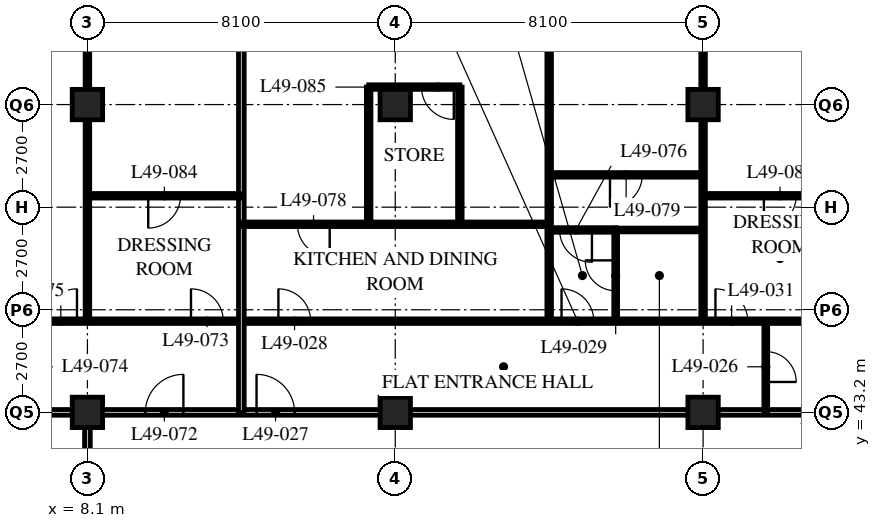
"""IFC4 building model, lengths in metres.
Left out: names, types, materials, properties, quantities, classifications, styles, units other than length and angle.
Written with IfcOpenShell. Run it as: python <this file> out.ifc"""

import sys

from ifc_helpers import new_model, si_unit, direction, frame, frame_2d, origin, origin_2d, place, context, subcontext, project, spatial, rectangle, hollow_rectangle, extrude, element, fill, save


model = new_model("IFC4")
c1 = context("Model", 3, precision=1e-05, world=origin(), true_north=direction((0.0, 1.0)))
c2 = subcontext(c1, "Body", "Model", "MODEL_VIEW")
j1 = project(units=[si_unit("LENGTHUNIT", "METRE"), si_unit("PLANEANGLEUNIT", "RADIAN")], contexts=[c1])
p1 = place(None, origin())
s1 = spatial("IfcSite", under=j1, at=p1, CompositionType="ELEMENT")
p2 = place(p1, origin())
s2 = spatial("IfcBuilding", under=s1, at=p2, CompositionType="ELEMENT")
p3 = place(p2, frame((0.0, 0.0, 192.0)))
s3 = spatial("IfcBuildingStorey", under=s2, at=p3, CompositionType="ELEMENT", Elevation=192.0)
for number, where, z_axis, x_axis in (
    (1, (8.1, 43.2, 0.0), (0.0, 0.0, 1.0), (1.0, 0.0, 0.0)),
    (2, (8.1, 51.3, 0.0), (0.0, 0.0, 1.0), (1.0, 0.0, 0.0)),
    (3, (16.2, 43.2, 0.0), (0.0, 0.0, 1.0), (1.0, 0.0, 0.0)),
    (4, (16.2, 51.3, 0.0), (0.0, 0.0, 1.0), (1.0, 0.0, 0.0)),
    (5, (24.3, 43.2, 0.0), (0.0, 0.0, 1.0), (1.0, 0.0, 0.0)),
    (6, (24.3, 51.3, 0.0), (0.0, 0.0, 1.0), (1.0, 0.0, 0.0)),
):
    element("IfcColumn", number, at=place(p3, frame(where, z_axis=z_axis, x_axis=x_axis)), inside=s3, PredefinedType="COLUMN", context=c2, shape_type="SweptSolid", body=[
        extrude(hollow_rectangle(XDim=0.8, YDim=0.8, WallThickness=0.08, at=origin_2d()), origin(), (0.0, 0.0, 1.0), 3.6),
    ])
p4 = place(p3, frame((8.1, 43.2, 0.0), z_axis=(0.0, 0.0, 1.0), x_axis=(1.0, 0.0, 0.0)))
e7 = element("IfcWall", 7, at=p4, inside=s3, PredefinedType="PARTITIONING", context=c2, shape_type="SweptSolid", body=[
    extrude(rectangle(XDim=40.5, YDim=0.15, at=frame_2d((20.25, 0.0))), origin(), (0.0, 0.0, 1.0), 2.778),
])
p5 = place(p4, frame((4.45, 0.0, 0.0)))
e8 = element("IfcOpeningElement", 8, at=p5, cuts=e7, PredefinedType="OPENING", context=c2, shape_type="SweptSolid", body=[
    extrude(rectangle(XDim=1.0, YDim=2.1, at=frame_2d((0.5, 1.05))), frame((0.0, 0.085, 0.0), z_axis=(0.0, -1.0, 0.0), x_axis=(1.0, 0.0, 0.0)), (0.0, 0.0, 1.0), 0.17),
])
p6 = place(p4, frame((20.65, 0.0, 0.0)))
e9 = element("IfcOpeningElement", 9, at=p6, cuts=e7, PredefinedType="OPENING", context=c2, shape_type="SweptSolid", body=[
    extrude(rectangle(XDim=1.0, YDim=2.1, at=frame_2d((0.5, 1.05))), frame((0.0, 0.085, 0.0), z_axis=(0.0, -1.0, 0.0), x_axis=(1.0, 0.0, 0.0)), (0.0, 0.0, 1.0), 0.17),
])
p7 = place(p4, frame((28.75, 0.0, 0.0)))
e10 = element("IfcOpeningElement", 10, at=p7, cuts=e7, PredefinedType="OPENING", context=c2, shape_type="SweptSolid", body=[
    extrude(rectangle(XDim=1.0, YDim=2.1, at=frame_2d((0.5, 1.05))), frame((0.0, 0.085, 0.0), z_axis=(0.0, -1.0, 0.0), x_axis=(1.0, 0.0, 0.0)), (0.0, 0.0, 1.0), 0.17),
])
p8 = place(p4, frame((37.975, 0.0, 0.0)))
e11 = element("IfcOpeningElement", 11, at=p8, cuts=e7, PredefinedType="OPENING", context=c2, shape_type="SweptSolid", body=[
    extrude(rectangle(XDim=1.0, YDim=2.1, at=frame_2d((0.5, 1.05))), frame((0.0, 0.085, 0.0), z_axis=(0.0, -1.0, 0.0), x_axis=(1.0, 0.0, 0.0)), (0.0, 0.0, 1.0), 0.17),
])
p9 = place(p4, frame((1.525, 0.0, 0.0)))
e12 = element("IfcOpeningElement", 12, at=p9, cuts=e7, PredefinedType="OPENING", context=c2, shape_type="SweptSolid", body=[
    extrude(rectangle(XDim=1.0, YDim=2.1, at=frame_2d((0.5, 1.05))), frame((0.0, 0.085, 0.0), z_axis=(0.0, -1.0, 0.0), x_axis=(1.0, 0.0, 0.0)), (0.0, 0.0, 1.0), 0.17),
])
p10 = place(p3, frame((8.1, 18.9, 0.0), z_axis=(0.0, 0.0, 1.0), x_axis=(0.0, 1.0, 0.0)))
e13 = element("IfcWall", 13, at=p10, inside=s3, PredefinedType="PARTITIONING", context=c2, shape_type="SweptSolid", body=[
    extrude(rectangle(XDim=24.3, YDim=0.15, at=frame_2d((12.15, 0.0))), origin(), (0.0, 0.0, 1.0), 2.778),
])
p11 = place(p10, frame((0.9, 0.0, 0.0)))
e14 = element("IfcOpeningElement", 14, at=p11, cuts=e13, PredefinedType="OPENING", context=c2, shape_type="SweptSolid", body=[
    extrude(rectangle(XDim=1.0, YDim=2.1, at=frame_2d((0.5, 1.05))), frame((0.0, 0.085, 0.0), z_axis=(0.0, -1.0, 0.0), x_axis=(1.0, 0.0, 0.0)), (0.0, 0.0, 1.0), 0.17),
])
p12 = place(p10, frame((9.0, 0.0, 0.0)))
e15 = element("IfcOpeningElement", 15, at=p12, cuts=e13, PredefinedType="OPENING", context=c2, shape_type="SweptSolid", body=[
    extrude(rectangle(XDim=1.0, YDim=2.1, at=frame_2d((0.5, 1.05))), frame((0.0, 0.085, 0.0), z_axis=(0.0, -1.0, 0.0), x_axis=(1.0, 0.0, 0.0)), (0.0, 0.0, 1.0), 0.17),
])
p13 = place(p10, frame((17.1, 0.0, 0.0)))
e16 = element("IfcOpeningElement", 16, at=p13, cuts=e13, PredefinedType="OPENING", context=c2, shape_type="SweptSolid", body=[
    extrude(rectangle(XDim=1.0, YDim=2.1, at=frame_2d((0.5, 1.05))), frame((0.0, 0.085, 0.0), z_axis=(0.0, -1.0, 0.0), x_axis=(1.0, 0.0, 0.0)), (0.0, 0.0, 1.0), 0.17),
])
p14 = place(p3, frame((25.95, 43.2, 0.0), z_axis=(0.0, 0.0, 1.0), x_axis=(0.0, 1.0, 0.0)))
e17 = element("IfcWall", 17, at=p14, inside=s3, PredefinedType="PARTITIONING", context=c2, shape_type="SweptSolid", body=[
    extrude(rectangle(XDim=2.4, YDim=0.1, at=frame_2d((1.2, 0.0))), origin(), (0.0, 0.0, 1.0), 3.39),
])
p15 = place(p14, frame((0.8, 0.0, 0.0)))
e18 = element("IfcOpeningElement", 18, at=p15, cuts=e17, PredefinedType="OPENING", context=c2, shape_type="SweptSolid", body=[
    extrude(rectangle(XDim=0.8, YDim=2.1, at=frame_2d((0.4, 1.05))), frame((0.0, 0.06, 0.0), z_axis=(0.0, -1.0, 0.0), x_axis=(1.0, 0.0, 0.0)), (0.0, 0.0, 1.0), 0.12),
])
p16 = place(p3, frame((22.0, 45.6, 0.0), z_axis=(0.0, 0.0, 1.0), x_axis=(0.0, 1.0, 0.0)))
e19 = element("IfcWall", 19, at=p16, inside=s3, PredefinedType="PARTITIONING", context=c2, shape_type="SweptSolid", body=[
    extrude(rectangle(XDim=2.4, YDim=0.1, at=frame_2d((1.2, 0.0))), origin(), (0.0, 0.0, 1.0), 3.39),
])
p17 = place(p16, frame((0.8, 0.0, 0.0)))
e20 = element("IfcOpeningElement", 20, at=p17, cuts=e19, PredefinedType="OPENING", context=c2, shape_type="SweptSolid", body=[
    extrude(rectangle(XDim=0.8, YDim=2.1, at=frame_2d((0.4, 1.05))), frame((0.0, 0.06, 0.0), z_axis=(0.0, -1.0, 0.0), x_axis=(1.0, 0.0, 0.0)), (0.0, 0.0, 1.0), 0.12),
])
p18 = place(p3, frame((22.0, 48.0, 0.0), z_axis=(0.0, 0.0, 1.0), x_axis=(1.0, 0.0, 0.0)))
e21 = element("IfcWall", 21, at=p18, inside=s3, PredefinedType="PARTITIONING", context=c2, shape_type="SweptSolid", body=[
    extrude(rectangle(XDim=2.3, YDim=0.1, at=frame_2d((1.15, 0.0))), origin(), (0.0, 0.0, 1.0), 3.39),
])
p19 = place(p3, frame((20.25, 45.6, 0.0), z_axis=(0.0, 0.0, 1.0), x_axis=(0.0, 1.0, 0.0)))
e22 = element("IfcWall", 22, at=p19, inside=s3, PredefinedType="PARTITIONING", context=c2, shape_type="SweptSolid", body=[
    extrude(rectangle(XDim=13.5, YDim=0.12, at=frame_2d((6.75, 0.0))), origin(), (0.0, 0.0, 1.0), 3.39),
])
p20 = place(p3, frame((24.3, 45.6, 0.0), z_axis=(0.0, 0.0, 1.0), x_axis=(0.0, 1.0, 0.0)))
e23 = element("IfcWall", 23, at=p20, inside=s3, PredefinedType="PARTITIONING", context=c2, shape_type="SweptSolid", body=[
    extrude(rectangle(XDim=13.5, YDim=0.12, at=frame_2d((6.75, 0.0))), origin(), (0.0, 0.0, 1.0), 2.778),
])
p21 = place(p3, frame((4.1, 45.6, 0.0), z_axis=(0.0, 0.0, 1.0), x_axis=(1.0, 0.0, 0.0)))
e24 = element("IfcWall", 24, at=p21, inside=s3, PredefinedType="PARTITIONING", context=c2, shape_type="SweptSolid", body=[
    extrude(rectangle(XDim=48.5, YDim=0.12, at=frame_2d((24.25, 0.0))), origin(), (0.0, 0.0, 1.0), 3.39),
])
p22 = place(p21, frame((9.025, 0.0, 0.0)))
e25 = element("IfcOpeningElement", 25, at=p22, cuts=e24, PredefinedType="OPENING", context=c2, shape_type="SweptSolid", body=[
    extrude(rectangle(XDim=0.85, YDim=2.1, at=frame_2d((0.425, 1.05))), frame((0.0, 0.07, 0.0), z_axis=(0.0, -1.0, 0.0), x_axis=(1.0, 0.0, 0.0)), (0.0, 0.0, 1.0), 0.14),
])
p23 = place(p21, frame((16.475, 0.0, 0.0)))
e26 = element("IfcOpeningElement", 26, at=p23, cuts=e24, PredefinedType="OPENING", context=c2, shape_type="SweptSolid", body=[
    extrude(rectangle(XDim=0.85, YDim=2.1, at=frame_2d((0.425, 1.05))), frame((0.0, 0.07, 0.0), z_axis=(0.0, -1.0, 0.0), x_axis=(1.0, 0.0, 0.0)), (0.0, 0.0, 1.0), 0.14),
])
p24 = place(p21, frame((20.525, 0.0, 0.0)))
e27 = element("IfcOpeningElement", 27, at=p24, cuts=e24, PredefinedType="OPENING", context=c2, shape_type="SweptSolid", body=[
    extrude(rectangle(XDim=0.85, YDim=2.1, at=frame_2d((0.425, 1.05))), frame((0.0, 0.07, 0.0), z_axis=(0.0, -1.0, 0.0), x_axis=(1.0, 0.0, 0.0)), (0.0, 0.0, 1.0), 0.14),
])
p25 = place(p21, frame((25.225, 0.0, 0.0)))
e28 = element("IfcOpeningElement", 28, at=p25, cuts=e24, PredefinedType="OPENING", context=c2, shape_type="SweptSolid", body=[
    extrude(rectangle(XDim=0.85, YDim=2.1, at=frame_2d((0.425, 1.05))), frame((0.0, 0.07, 0.0), z_axis=(0.0, -1.0, 0.0), x_axis=(1.0, 0.0, 0.0)), (0.0, 0.0, 1.0), 0.14),
])
p26 = place(p21, frame((28.625, 0.0, 0.0)))
e29 = element("IfcOpeningElement", 29, at=p26, cuts=e24, PredefinedType="OPENING", context=c2, shape_type="SweptSolid", body=[
    extrude(rectangle(XDim=0.85, YDim=2.1, at=frame_2d((0.425, 1.05))), frame((0.0, 0.07, 0.0), z_axis=(0.0, -1.0, 0.0), x_axis=(1.0, 0.0, 0.0)), (0.0, 0.0, 1.0), 0.14),
])
p27 = place(p21, frame((33.325, 0.0, 0.0)))
e30 = element("IfcOpeningElement", 30, at=p27, cuts=e24, PredefinedType="OPENING", context=c2, shape_type="SweptSolid", body=[
    extrude(rectangle(XDim=0.85, YDim=2.1, at=frame_2d((0.425, 1.05))), frame((0.0, 0.07, 0.0), z_axis=(0.0, -1.0, 0.0), x_axis=(1.0, 0.0, 0.0)), (0.0, 0.0, 1.0), 0.14),
])
p28 = place(p21, frame((36.725, 0.0, 0.0)))
e31 = element("IfcOpeningElement", 31, at=p28, cuts=e24, PredefinedType="OPENING", context=c2, shape_type="SweptSolid", body=[
    extrude(rectangle(XDim=0.85, YDim=2.1, at=frame_2d((0.425, 1.05))), frame((0.0, 0.07, 0.0), z_axis=(0.0, -1.0, 0.0), x_axis=(1.0, 0.0, 0.0)), (0.0, 0.0, 1.0), 0.14),
])
p29 = place(p21, frame((40.925, 0.0, 0.0)))
e32 = element("IfcOpeningElement", 32, at=p29, cuts=e24, PredefinedType="OPENING", context=c2, shape_type="SweptSolid", body=[
    extrude(rectangle(XDim=0.85, YDim=2.1, at=frame_2d((0.425, 1.05))), frame((0.0, 0.07, 0.0), z_axis=(0.0, -1.0, 0.0), x_axis=(1.0, 0.0, 0.0)), (0.0, 0.0, 1.0), 0.14),
])
p30 = place(p21, frame((44.775, 0.0, 0.0)))
e33 = element("IfcOpeningElement", 33, at=p30, cuts=e24, PredefinedType="OPENING", context=c2, shape_type="SweptSolid", body=[
    extrude(rectangle(XDim=0.85, YDim=2.1, at=frame_2d((0.425, 1.05))), frame((0.0, 0.07, 0.0), z_axis=(0.0, -1.0, 0.0), x_axis=(1.0, 0.0, 0.0)), (0.0, 0.0, 1.0), 0.14),
])
p31 = place(p21, frame((6.725, 0.0, 0.0)))
e34 = element("IfcOpeningElement", 34, at=p31, cuts=e24, PredefinedType="OPENING", context=c2, shape_type="SweptSolid", body=[
    extrude(rectangle(XDim=0.85, YDim=2.1, at=frame_2d((0.425, 1.05))), frame((0.0, 0.07, 0.0), z_axis=(0.0, -1.0, 0.0), x_axis=(1.0, 0.0, 0.0)), (0.0, 0.0, 1.0), 0.14),
])
p32 = place(p21, frame((2.875, 0.0, 0.0)))
e35 = element("IfcOpeningElement", 35, at=p32, cuts=e24, PredefinedType="OPENING", context=c2, shape_type="SweptSolid", body=[
    extrude(rectangle(XDim=0.85, YDim=2.1, at=frame_2d((0.425, 1.05))), frame((0.0, 0.07, 0.0), z_axis=(0.0, -1.0, 0.0), x_axis=(1.0, 0.0, 0.0)), (0.0, 0.0, 1.0), 0.14),
])
p33 = place(p3, frame((8.1, 45.6, 0.0), z_axis=(0.0, 0.0, 1.0), x_axis=(0.0, 1.0, 0.0)))
e36 = element("IfcWall", 36, at=p33, inside=s3, PredefinedType="PARTITIONING", context=c2, shape_type="SweptSolid", body=[
    extrude(rectangle(XDim=9.45, YDim=0.12, at=frame_2d((4.725, 0.0))), origin(), (0.0, 0.0, 1.0), 2.778),
])
p34 = place(p3, frame((0.3, 43.2, 0.0), z_axis=(0.0, 0.0, 1.0), x_axis=(1.0, 0.0, 0.0)))
e37 = element("IfcWall", 37, at=p34, inside=s3, PredefinedType="PARTITIONING", context=c2, shape_type="SweptSolid", body=[
    extrude(rectangle(XDim=7.8, YDim=0.15, at=frame_2d((3.9, 0.0))), origin(), (0.0, 0.0, 1.0), 2.778),
])
p35 = place(p3, frame((12.15, 43.2, 0.0), z_axis=(0.0, 0.0, 1.0), x_axis=(0.0, 1.0, 0.0)))
e38 = element("IfcWall", 38, at=p35, inside=s3, PredefinedType="PARTITIONING", context=c2, shape_type="SweptSolid", body=[
    extrude(rectangle(XDim=15.9, YDim=0.15, at=frame_2d((7.95, 0.0))), origin(), (0.0, 0.0, 1.0), 3.39),
])
p36 = place(p3, frame((20.25, 48.0, 0.0), z_axis=(0.0, 0.0, 1.0), x_axis=(1.0, 0.0, 0.0)))
e39 = element("IfcWall", 39, at=p36, inside=s3, PredefinedType="PARTITIONING", context=c2, shape_type="SweptSolid", body=[
    extrude(rectangle(XDim=1.76, YDim=0.12, at=frame_2d((0.88, 0.0))), origin(), (0.0, 0.0, 1.0), 3.39),
])
p37 = place(p36, frame((0.275, 0.0, 0.0)))
e40 = element("IfcOpeningElement", 40, at=p37, cuts=e39, PredefinedType="OPENING", context=c2, shape_type="SweptSolid", body=[
    extrude(rectangle(XDim=0.85, YDim=2.1, at=frame_2d((0.425, 1.05))), frame((0.0, 0.07, 0.0), z_axis=(0.0, -1.0, 0.0), x_axis=(1.0, 0.0, 0.0)), (0.0, 0.0, 1.0), 0.14),
])
p38 = place(p3, frame((12.15, 48.15, 0.0), z_axis=(0.0, 0.0, 1.0), x_axis=(1.0, 0.0, 0.0)))
e41 = element("IfcWall", 41, at=p38, inside=s3, PredefinedType="PARTITIONING", context=c2, shape_type="SweptSolid", body=[
    extrude(rectangle(XDim=8.1, YDim=0.12, at=frame_2d((4.05, 0.0))), origin(), (0.0, 0.0, 1.0), 3.39),
])
p39 = place(p38, frame((1.475, 0.0, 0.0)))
e42 = element("IfcOpeningElement", 42, at=p39, cuts=e41, PredefinedType="OPENING", context=c2, shape_type="SweptSolid", body=[
    extrude(rectangle(XDim=0.85, YDim=2.1, at=frame_2d((0.425, 1.05))), frame((0.0, 0.07, 0.0), z_axis=(0.0, -1.0, 0.0), x_axis=(1.0, 0.0, 0.0)), (0.0, 0.0, 1.0), 0.14),
])
p40 = place(p3, frame((20.25, 49.45, 0.0), z_axis=(0.0, 0.0, 1.0), x_axis=(1.0, 0.0, 0.0)))
e43 = element("IfcWall", 43, at=p40, inside=s3, PredefinedType="PARTITIONING", context=c2, shape_type="SweptSolid", body=[
    extrude(rectangle(XDim=4.05, YDim=0.12, at=frame_2d((2.025, 0.0))), origin(), (0.0, 0.0, 1.0), 3.39),
])
p41 = place(p40, frame((1.6, 0.0, 0.0)))
e44 = element("IfcOpeningElement", 44, at=p41, cuts=e43, PredefinedType="OPENING", context=c2, shape_type="SweptSolid", body=[
    extrude(rectangle(XDim=0.85, YDim=2.1, at=frame_2d((0.425, 1.05))), frame((0.0, 0.07, 0.0), z_axis=(0.0, -1.0, 0.0), x_axis=(1.0, 0.0, 0.0)), (0.0, 0.0, 1.0), 0.14),
])
p42 = place(p3, frame((24.3, 48.9, 0.0), z_axis=(0.0, 0.0, 1.0), x_axis=(1.0, 0.0, 0.0)))
e45 = element("IfcWall", 45, at=p42, inside=s3, PredefinedType="PARTITIONING", context=c2, shape_type="SweptSolid", body=[
    extrude(rectangle(XDim=4.05, YDim=0.12, at=frame_2d((2.025, 0.0))), origin(), (0.0, 0.0, 1.0), 3.39),
])
p43 = place(p42, frame((1.6, 0.0, 0.0)))
e46 = element("IfcOpeningElement", 46, at=p43, cuts=e45, PredefinedType="OPENING", context=c2, shape_type="SweptSolid", body=[
    extrude(rectangle(XDim=0.85, YDim=2.1, at=frame_2d((0.425, 1.05))), frame((0.0, 0.07, 0.0), z_axis=(0.0, -1.0, 0.0), x_axis=(1.0, 0.0, 0.0)), (0.0, 0.0, 1.0), 0.14),
])
p44 = place(p3, frame((8.1, 48.9, 0.0), z_axis=(0.0, 0.0, 1.0), x_axis=(1.0, 0.0, 0.0)))
e47 = element("IfcWall", 47, at=p44, inside=s3, PredefinedType="PARTITIONING", context=c2, shape_type="SweptSolid", body=[
    extrude(rectangle(XDim=4.05, YDim=0.12, at=frame_2d((2.025, 0.0))), origin(), (0.0, 0.0, 1.0), 3.39),
])
p45 = place(p44, frame((1.6, 0.0, 0.0)))
e48 = element("IfcOpeningElement", 48, at=p45, cuts=e47, PredefinedType="OPENING", context=c2, shape_type="SweptSolid", body=[
    extrude(rectangle(XDim=0.85, YDim=2.1, at=frame_2d((0.425, 1.05))), frame((0.0, 0.07, 0.0), z_axis=(0.0, -1.0, 0.0), x_axis=(1.0, 0.0, 0.0)), (0.0, 0.0, 1.0), 0.14),
])
for number, where, z_axis, x_axis in (
    (49, (15.5, 48.15, 0.0), (0.0, 0.0, 1.0), (0.0, 1.0, 0.0)),
    (50, (17.9, 48.15, 0.0), (0.0, 0.0, 1.0), (0.0, 1.0, 0.0)),
):
    element("IfcWall", number, at=place(p3, frame(where, z_axis=z_axis, x_axis=x_axis)), inside=s3, PredefinedType="PARTITIONING", context=c2, shape_type="SweptSolid", body=[
        extrude(rectangle(XDim=3.61, YDim=0.12, at=frame_2d((1.805, 0.0))), origin(), (0.0, 0.0, 1.0), 3.39),
    ])
p46 = place(p3, frame((15.5, 51.76, 0.0), z_axis=(0.0, 0.0, 1.0), x_axis=(1.0, 0.0, 0.0)))
e51 = element("IfcWall", 51, at=p46, inside=s3, PredefinedType="PARTITIONING", context=c2, shape_type="SweptSolid", body=[
    extrude(rectangle(XDim=2.4, YDim=0.12, at=frame_2d((1.2, 0.0))), origin(), (0.0, 0.0, 1.0), 3.39),
])
p47 = place(p46, frame((1.39, 0.0, 0.0)))
e52 = element("IfcOpeningElement", 52, at=p47, cuts=e51, PredefinedType="OPENING", context=c2, shape_type="SweptSolid", body=[
    extrude(rectangle(XDim=0.85, YDim=2.1, at=frame_2d((0.425, 1.05))), frame((0.0, 0.07, 0.0), z_axis=(0.0, -1.0, 0.0), x_axis=(1.0, 0.0, 0.0)), (0.0, 0.0, 1.0), 0.14),
])
p48 = place(p15, origin())
e53 = element("IfcDoor", 53, at=p48, inside=s3, OperationType="SINGLE_SWING_RIGHT", PredefinedType="DOOR", context=c2, shape_type="SweptSolid", body=[
    extrude(rectangle(XDim=0.8, YDim=2.1, at=frame_2d((0.4, 1.05))), frame((0.0, 0.025, 0.0), z_axis=(0.0, -1.0, 0.0), x_axis=(1.0, 0.0, 0.0)), (0.0, 0.0, 1.0), 0.05),
])
fill(e18, e53)
p49 = place(p5, origin())
e54 = element("IfcDoor", 54, at=p49, inside=s3, OperationType="SINGLE_SWING_LEFT", PredefinedType="DOOR", context=c2, shape_type="SweptSolid", body=[
    extrude(rectangle(XDim=1.0, YDim=2.1, at=frame_2d((0.5, 1.05))), frame((0.0, 0.025, 0.0), z_axis=(0.0, -1.0, 0.0), x_axis=(1.0, 0.0, 0.0)), (0.0, 0.0, 1.0), 0.05),
])
fill(e8, e54)
p50 = place(p22, origin())
e55 = element("IfcDoor", 55, at=p50, inside=s3, OperationType="SINGLE_SWING_LEFT", PredefinedType="DOOR", context=c2, shape_type="SweptSolid", body=[
    extrude(rectangle(XDim=0.85, YDim=2.1, at=frame_2d((0.425, 1.05))), frame((0.0, 0.025, 0.0), z_axis=(0.0, -1.0, 0.0), x_axis=(1.0, 0.0, 0.0)), (0.0, 0.0, 1.0), 0.05),
])
fill(e25, e55)
p51 = place(p17, origin())
e56 = element("IfcDoor", 56, at=p51, inside=s3, OperationType="SINGLE_SWING_RIGHT", PredefinedType="DOOR", context=c2, shape_type="SweptSolid", body=[
    extrude(rectangle(XDim=0.8, YDim=2.1, at=frame_2d((0.4, 1.05))), frame((0.0, 0.025, 0.0), z_axis=(0.0, -1.0, 0.0), x_axis=(1.0, 0.0, 0.0)), (0.0, 0.0, 1.0), 0.05),
])
fill(e20, e56)
p52 = place(p23, origin())
e57 = element("IfcDoor", 57, at=p52, inside=s3, OperationType="SINGLE_SWING_LEFT", PredefinedType="DOOR", context=c2, shape_type="SweptSolid", body=[
    extrude(rectangle(XDim=0.85, YDim=2.1, at=frame_2d((0.425, 1.05))), frame((0.0, 0.025, 0.0), z_axis=(0.0, -1.0, 0.0), x_axis=(1.0, 0.0, 0.0)), (0.0, 0.0, 1.0), 0.05),
])
fill(e26, e57)
p53 = place(p24, origin())
e58 = element("IfcDoor", 58, at=p53, inside=s3, OperationType="SINGLE_SWING_LEFT", PredefinedType="DOOR", context=c2, shape_type="SweptSolid", body=[
    extrude(rectangle(XDim=0.85, YDim=2.1, at=frame_2d((0.425, 1.05))), frame((0.0, 0.025, 0.0), z_axis=(0.0, -1.0, 0.0), x_axis=(1.0, 0.0, 0.0)), (0.0, 0.0, 1.0), 0.05),
])
fill(e27, e58)
p54 = place(p9, origin())
e59 = element("IfcDoor", 59, at=p54, inside=s3, OperationType="SINGLE_SWING_RIGHT", PredefinedType="DOOR", context=c2, shape_type="SweptSolid", body=[
    extrude(rectangle(XDim=1.0, YDim=2.1, at=frame_2d((0.5, 1.05))), frame((0.0, 0.025, 0.0), z_axis=(0.0, -1.0, 0.0), x_axis=(1.0, 0.0, 0.0)), (0.0, 0.0, 1.0), 0.05),
])
fill(e12, e59)
p55 = place(p31, origin())
e60 = element("IfcDoor", 60, at=p55, inside=s3, OperationType="SINGLE_SWING_LEFT", PredefinedType="DOOR", context=c2, shape_type="SweptSolid", body=[
    extrude(rectangle(XDim=0.85, YDim=2.1, at=frame_2d((0.425, 1.05))), frame((0.0, 0.025, 0.0), z_axis=(0.0, -1.0, 0.0), x_axis=(1.0, 0.0, 0.0)), (0.0, 0.0, 1.0), 0.05),
])
fill(e34, e60)
p56 = place(p32, origin())
e61 = element("IfcDoor", 61, at=p56, inside=s3, OperationType="SINGLE_SWING_RIGHT", PredefinedType="DOOR", context=c2, shape_type="SweptSolid", body=[
    extrude(rectangle(XDim=0.85, YDim=2.1, at=frame_2d((0.425, 1.05))), frame((0.0, 0.025, 0.0), z_axis=(0.0, -1.0, 0.0), x_axis=(1.0, 0.0, 0.0)), (0.0, 0.0, 1.0), 0.05),
])
fill(e35, e61)
p57 = place(p37, origin())
e62 = element("IfcDoor", 62, at=p57, inside=s3, OperationType="SINGLE_SWING_LEFT", PredefinedType="DOOR", context=c2, shape_type="SweptSolid", body=[
    extrude(rectangle(XDim=0.85, YDim=2.1, at=frame_2d((0.425, 1.05))), frame((0.0, 0.025, 0.0), z_axis=(0.0, -1.0, 0.0), x_axis=(1.0, 0.0, 0.0)), (0.0, 0.0, 1.0), 0.05),
])
fill(e40, e62)
p58 = place(p39, origin())
e63 = element("IfcDoor", 63, at=p58, inside=s3, OperationType="SINGLE_SWING_LEFT", PredefinedType="DOOR", context=c2, shape_type="SweptSolid", body=[
    extrude(rectangle(XDim=0.85, YDim=2.1, at=frame_2d((0.425, 1.05))), frame((0.0, 0.025, 0.0), z_axis=(0.0, -1.0, 0.0), x_axis=(1.0, 0.0, 0.0)), (0.0, 0.0, 1.0), 0.05),
])
fill(e42, e63)
p59 = place(p41, origin())
e64 = element("IfcDoor", 64, at=p59, inside=s3, OperationType="SINGLE_SWING_RIGHT", PredefinedType="DOOR", context=c2, shape_type="SweptSolid", body=[
    extrude(rectangle(XDim=0.85, YDim=2.1, at=frame_2d((0.425, 1.05))), frame((0.0, 0.025, 0.0), z_axis=(0.0, -1.0, 0.0), x_axis=(1.0, 0.0, 0.0)), (0.0, 0.0, 1.0), 0.05),
])
fill(e44, e64)
p60 = place(p43, origin())
e65 = element("IfcDoor", 65, at=p60, inside=s3, OperationType="SINGLE_SWING_RIGHT", PredefinedType="DOOR", context=c2, shape_type="SweptSolid", body=[
    extrude(rectangle(XDim=0.85, YDim=2.1, at=frame_2d((0.425, 1.05))), frame((0.0, 0.025, 0.0), z_axis=(0.0, -1.0, 0.0), x_axis=(1.0, 0.0, 0.0)), (0.0, 0.0, 1.0), 0.05),
])
fill(e46, e65)
p61 = place(p45, origin())
e66 = element("IfcDoor", 66, at=p61, inside=s3, OperationType="SINGLE_SWING_RIGHT", PredefinedType="DOOR", context=c2, shape_type="SweptSolid", body=[
    extrude(rectangle(XDim=0.85, YDim=2.1, at=frame_2d((0.425, 1.05))), frame((0.0, 0.025, 0.0), z_axis=(0.0, -1.0, 0.0), x_axis=(1.0, 0.0, 0.0)), (0.0, 0.0, 1.0), 0.05),
])
fill(e48, e66)
p62 = place(p47, origin())
e67 = element("IfcDoor", 67, at=p62, inside=s3, OperationType="SINGLE_SWING_LEFT", PredefinedType="DOOR", context=c2, shape_type="SweptSolid", body=[
    extrude(rectangle(XDim=0.85, YDim=2.1, at=frame_2d((0.425, 1.05))), frame((0.0, 0.025, 0.0), z_axis=(0.0, -1.0, 0.0), x_axis=(1.0, 0.0, 0.0)), (0.0, 0.0, 1.0), 0.05),
])
fill(e52, e67)
save(model, sys.argv[1])
